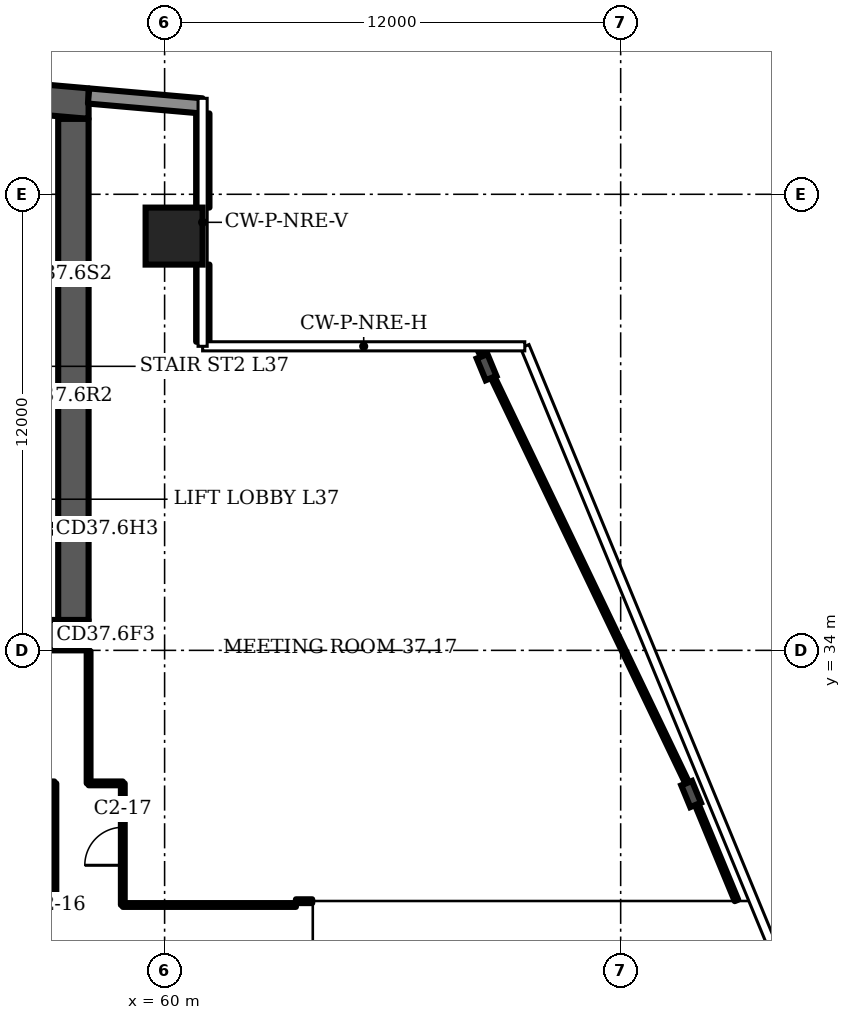
"""IFC4 building model, lengths in metres.
Left out: names, types, materials, properties, quantities, classifications, styles, units other than length and angle.
Written with IfcOpenShell. Run it as: python <this file> out.ifc"""

import sys

from ifc_helpers import new_model, si_unit, direction, frame, frame_2d, origin, origin_2d, place, context, subcontext, project, spatial, polyline, rectangle, i_section, outline, extrude, element, fill, save


model = new_model("IFC4")
c1 = context("Model", 3, precision=1e-05, world=origin(), true_north=direction((0.0, 1.0)))
c2 = subcontext(c1, "Body", "Model", "MODEL_VIEW")
j1 = project(units=[si_unit("LENGTHUNIT", "METRE"), si_unit("PLANEANGLEUNIT", "RADIAN")], contexts=[c1])
p1 = place(None, origin())
s1 = spatial("IfcSite", under=j1, at=p1, CompositionType="ELEMENT")
p2 = place(p1, origin())
s2 = spatial("IfcBuilding", under=s1, at=p2, CompositionType="ELEMENT")
p3 = place(p2, frame((0.0, 0.0, 155.5)))
s3 = spatial("IfcBuildingStorey", under=s2, at=p3, CompositionType="ELEMENT", Elevation=155.5)
p4 = place(p3, origin())
e1 = element("IfcWall", 1, at=p4, inside=s3, PredefinedType="SHEAR", context=c2, shape_type="SweptSolid", body=[
    extrude(outline(polyline([(16.0, 47.984), (37.0, 49.822), (58.0, 47.984), (58.0, 48.787), (37.0, 50.625), (16.0, 48.787), (16.0, 47.984)])), origin(), (0.0, 0.0, 1.0), 3.6),
])
p5 = place(p3, frame((16.0, 34.4, 0.0), z_axis=(0.0, 0.0, 1.0), x_axis=(1.0, 0.0, 0.0)))
e2 = element("IfcWall", 2, at=p5, inside=s3, PredefinedType="SHEAR", context=c2, shape_type="SweptSolid", body=[
    extrude(rectangle(XDim=42.0, YDim=0.8, at=frame_2d((21.0, 0.0))), origin(), (0.0, 0.0, 1.0), 3.6),
])
p6 = place(p5, frame((1.75, 0.0, 0.0)))
e3 = element("IfcOpeningElement", 3, at=p6, cuts=e2, PredefinedType="OPENING", context=c2, shape_type="SweptSolid", body=[
    extrude(rectangle(XDim=1.0, YDim=2.1, at=frame_2d((0.5, 1.05))), frame((0.0, 0.41, 0.0), z_axis=(0.0, -1.0, 0.0), x_axis=(1.0, 0.0, 0.0)), (0.0, 0.0, 1.0), 0.82),
])
p7 = place(p5, frame((4.65, 0.0, 0.0)))
e4 = element("IfcOpeningElement", 4, at=p7, cuts=e2, PredefinedType="OPENING", context=c2, shape_type="SweptSolid", body=[
    extrude(rectangle(XDim=1.0, YDim=2.1, at=frame_2d((0.5, 1.05))), frame((0.0, 0.41, 0.0), z_axis=(0.0, -1.0, 0.0), x_axis=(1.0, 0.0, 0.0)), (0.0, 0.0, 1.0), 0.82),
])
p8 = place(p5, frame((7.65, 0.0, 0.0)))
e5 = element("IfcOpeningElement", 5, at=p8, cuts=e2, PredefinedType="OPENING", context=c2, shape_type="SweptSolid", body=[
    extrude(rectangle(XDim=1.2, YDim=2.1, at=frame_2d((0.6, 1.05))), frame((0.0, 0.41, 0.0), z_axis=(0.0, -1.0, 0.0), x_axis=(1.0, 0.0, 0.0)), (0.0, 0.0, 1.0), 0.82),
])
p9 = place(p5, frame((14.767, 0.0, 0.0)))
e6 = element("IfcOpeningElement", 6, at=p9, cuts=e2, PredefinedType="OPENING", context=c2, shape_type="SweptSolid", body=[
    extrude(rectangle(XDim=1.1, YDim=2.1, at=frame_2d((0.55, 1.05))), frame((0.0, 0.41, 0.0), z_axis=(0.0, -1.0, 0.0), x_axis=(1.0, 0.0, 0.0)), (0.0, 0.0, 1.0), 0.82),
])
p10 = place(p5, frame((19.133, 0.0, 0.0)))
e7 = element("IfcOpeningElement", 7, at=p10, cuts=e2, PredefinedType="OPENING", context=c2, shape_type="SweptSolid", body=[
    extrude(rectangle(XDim=1.1, YDim=2.1, at=frame_2d((0.55, 1.05))), frame((0.0, 0.41, 0.0), z_axis=(0.0, -1.0, 0.0), x_axis=(1.0, 0.0, 0.0)), (0.0, 0.0, 1.0), 0.82),
])
p11 = place(p5, frame((16.8, 0.0, 0.0)))
e8 = element("IfcOpeningElement", 8, at=p11, cuts=e2, PredefinedType="OPENING", context=c2, shape_type="SweptSolid", body=[
    extrude(rectangle(XDim=1.4, YDim=2.1, at=frame_2d((0.7, 1.05))), frame((0.0, 0.41, 0.0), z_axis=(0.0, -1.0, 0.0), x_axis=(1.0, 0.0, 0.0)), (0.0, 0.0, 1.0), 0.82),
])
p12 = place(p5, frame((21.767, 0.0, 0.0)))
e9 = element("IfcOpeningElement", 9, at=p12, cuts=e2, PredefinedType="OPENING", context=c2, shape_type="SweptSolid", body=[
    extrude(rectangle(XDim=1.1, YDim=2.1, at=frame_2d((0.55, 1.05))), frame((0.0, 0.41, 0.0), z_axis=(0.0, -1.0, 0.0), x_axis=(1.0, 0.0, 0.0)), (0.0, 0.0, 1.0), 0.82),
])
p13 = place(p5, frame((23.95, 0.0, 0.0)))
e10 = element("IfcOpeningElement", 10, at=p13, cuts=e2, PredefinedType="OPENING", context=c2, shape_type="SweptSolid", body=[
    extrude(rectangle(XDim=1.1, YDim=2.1, at=frame_2d((0.55, 1.05))), frame((0.0, 0.41, 0.0), z_axis=(0.0, -1.0, 0.0), x_axis=(1.0, 0.0, 0.0)), (0.0, 0.0, 1.0), 0.82),
])
p14 = place(p5, frame((26.133, 0.0, 0.0)))
e11 = element("IfcOpeningElement", 11, at=p14, cuts=e2, PredefinedType="OPENING", context=c2, shape_type="SweptSolid", body=[
    extrude(rectangle(XDim=1.1, YDim=2.1, at=frame_2d((0.55, 1.05))), frame((0.0, 0.41, 0.0), z_axis=(0.0, -1.0, 0.0), x_axis=(1.0, 0.0, 0.0)), (0.0, 0.0, 1.0), 0.82),
])
p15 = place(p5, frame((33.15, 0.0, 0.0)))
e12 = element("IfcOpeningElement", 12, at=p15, cuts=e2, PredefinedType="OPENING", context=c2, shape_type="SweptSolid", body=[
    extrude(rectangle(XDim=1.2, YDim=2.1, at=frame_2d((0.6, 1.05))), frame((0.0, 0.41, 0.0), z_axis=(0.0, -1.0, 0.0), x_axis=(1.0, 0.0, 0.0)), (0.0, 0.0, 1.0), 0.82),
])
p16 = place(p5, frame((35.817, 0.0, 0.0)))
e13 = element("IfcOpeningElement", 13, at=p16, cuts=e2, PredefinedType="OPENING", context=c2, shape_type="SweptSolid", body=[
    extrude(rectangle(XDim=1.0, YDim=2.1, at=frame_2d((0.5, 1.05))), frame((0.0, 0.41, 0.0), z_axis=(0.0, -1.0, 0.0), x_axis=(1.0, 0.0, 0.0)), (0.0, 0.0, 1.0), 0.82),
])
p17 = place(p5, frame((39.95, 0.0, 0.0)))
e14 = element("IfcOpeningElement", 14, at=p17, cuts=e2, PredefinedType="OPENING", context=c2, shape_type="SweptSolid", body=[
    extrude(rectangle(XDim=1.0, YDim=2.1, at=frame_2d((0.5, 1.05))), frame((0.0, 0.41, 0.0), z_axis=(0.0, -1.0, 0.0), x_axis=(1.0, 0.0, 0.0)), (0.0, 0.0, 1.0), 0.82),
])
p18 = place(p5, frame((37.767, 0.0, 0.0)))
e15 = element("IfcOpeningElement", 15, at=p18, cuts=e2, PredefinedType="OPENING", context=c2, shape_type="SweptSolid", body=[
    extrude(rectangle(XDim=1.4, YDim=2.1, at=frame_2d((0.7, 1.05))), frame((0.0, 0.41, 0.0), z_axis=(0.0, -1.0, 0.0), x_axis=(1.0, 0.0, 0.0)), (0.0, 0.0, 1.0), 0.82),
])
p19 = place(p3, frame((57.6, 34.8, 0.0), z_axis=(0.0, 0.0, 1.0), x_axis=(0.0, 1.0, 0.0)))
e16 = element("IfcWall", 16, at=p19, inside=s3, PredefinedType="SHEAR", context=c2, shape_type="SweptSolid", body=[
    extrude(rectangle(XDim=13.184, YDim=0.8, at=frame_2d((6.592, 0.0))), origin(), (0.0, 0.0, 1.0), 3.6),
])
p20 = place(p3, frame((60.25, 44.9, 0.0), z_axis=(0.0, 0.0, 1.0), x_axis=(1.0, 0.0, 0.0)))
e17 = element("IfcColumn", 17, at=p20, inside=s3, PredefinedType="COLUMN", context=c2, shape_type="SweptSolid", body=[
    extrude(rectangle(XDim=1.5, YDim=1.5, at=origin_2d()), origin(), (0.0, 0.0, 1.0), 3.6),
])
for number, where, z_axis, x_axis in (
    (18, (73.854, 30.219, 0.0), (0.0, 0.0, 1.0), (0.924, 0.382, 0.0)),
    (19, (68.472, 41.45, 0.0), (0.0, 0.0, 1.0), (0.924, 0.382, 0.0)),
):
    element("IfcColumn", number, at=place(p3, frame(where, z_axis=z_axis, x_axis=x_axis)), inside=s3, PredefinedType="COLUMN", context=c2, shape_type="SweptSolid", body=[
        extrude(i_section(OverallWidth=0.305, OverallDepth=0.62, WebThickness=0.021, FlangeThickness=0.04, FilletRadius=0.027, at=origin_2d()), origin(), (0.0, 0.0, 1.0), 3.6),
    ])
p21 = place(p3, frame((60.983, 48.326, 0.0), z_axis=(0.0, 0.0, 1.0), x_axis=(-0.996194, 0.087168, 0.0)))
e20 = element("IfcWall", 20, at=p21, inside=s3, PredefinedType="SOLIDWALL", context=c2, shape_type="SweptSolid", body=[
    extrude(rectangle(XDim=2.994, YDim=0.4, at=frame_2d((1.497, 0.0))), origin(), (0.0, 0.0, 1.0), 3.2),
])
p22 = place(p3, frame((61.005, 42.12, 0.0), z_axis=(0.0, 0.0, 1.0), x_axis=(0.0, 1.0, 0.0)))
e21 = element("IfcWall", 21, at=p22, inside=s3, PredefinedType="SOLIDWALL", context=c2, shape_type="SweptSolid", body=[
    extrude(rectangle(XDim=2.03, YDim=0.35, at=frame_2d((1.015, 0.0))), origin(), (0.0, 0.0, 1.0), 1.0),
])
p23 = place(p3, frame((61.005, 45.65, 0.0), z_axis=(0.0, 0.0, 1.0), x_axis=(0.0, 1.0, 0.0)))
e22 = element("IfcWall", 22, at=p23, inside=s3, PredefinedType="SOLIDWALL", context=c2, shape_type="SweptSolid", body=[
    extrude(rectangle(XDim=2.477, YDim=0.35, at=frame_2d((1.238, 0.0))), origin(), (0.0, 0.0, 1.0), 1.0),
])
p24 = place(p3, frame((55.7, 37.2, 0.0), z_axis=(0.0, 0.0, 1.0), x_axis=(1.0, 0.0, 0.0)))
e23 = element("IfcWall", 23, at=p24, inside=s3, PredefinedType="PARTITIONING", context=c2, shape_type="SweptSolid", body=[
    extrude(rectangle(XDim=1.5, YDim=0.2, at=frame_2d((0.75, 0.0))), origin(), (0.0, 0.0, 1.0), 3.2),
])
p25 = place(p24, frame((0.25, 0.0, 0.0)))
e24 = element("IfcOpeningElement", 24, at=p25, cuts=e23, PredefinedType="OPENING", context=c2, shape_type="SweptSolid", body=[
    extrude(rectangle(XDim=1.0, YDim=2.1, at=frame_2d((0.5, 1.05))), frame((0.0, 0.11, 0.0), z_axis=(0.0, -1.0, 0.0), x_axis=(1.0, 0.0, 0.0)), (0.0, 0.0, 1.0), 0.22),
])
p26 = place(p3, frame((51.4, 40.7, 0.0), z_axis=(0.0, 0.0, 1.0), x_axis=(1.0, 0.0, 0.0)))
e25 = element("IfcWall", 25, at=p26, inside=s3, PredefinedType="PARTITIONING", context=c2, shape_type="SweptSolid", body=[
    extrude(rectangle(XDim=5.8, YDim=0.2, at=frame_2d((2.9, 0.0))), origin(), (0.0, 0.0, 1.0), 3.2),
])
p27 = place(p26, frame((0.367, 0.0, 0.0)))
e26 = element("IfcOpeningElement", 26, at=p27, cuts=e25, PredefinedType="OPENING", context=c2, shape_type="SweptSolid", body=[
    extrude(rectangle(XDim=1.1, YDim=2.1, at=frame_2d((0.55, 1.05))), frame((0.0, 0.11, 0.0), z_axis=(0.0, -1.0, 0.0), x_axis=(1.0, 0.0, 0.0)), (0.0, 0.0, 1.0), 0.22),
])
p28 = place(p26, frame((3.417, 0.0, 0.0)))
e27 = element("IfcOpeningElement", 27, at=p28, cuts=e25, PredefinedType="OPENING", context=c2, shape_type="SweptSolid", body=[
    extrude(rectangle(XDim=1.0, YDim=2.1, at=frame_2d((0.5, 1.05))), frame((0.0, 0.11, 0.0), z_axis=(0.0, -1.0, 0.0), x_axis=(1.0, 0.0, 0.0)), (0.0, 0.0, 1.0), 0.22),
])
p29 = place(p3, frame((51.4, 43.9, 0.0), z_axis=(0.0, 0.0, 1.0), x_axis=(1.0, 0.0, 0.0)))
e28 = element("IfcWall", 28, at=p29, inside=s3, PredefinedType="PARTITIONING", context=c2, shape_type="SweptSolid", body=[
    extrude(rectangle(XDim=5.8, YDim=0.2, at=frame_2d((2.9, 0.0))), origin(), (0.0, 0.0, 1.0), 3.2),
])
p30 = place(p29, frame((3.417, 0.0, 0.0)))
e29 = element("IfcOpeningElement", 29, at=p30, cuts=e28, PredefinedType="OPENING", context=c2, shape_type="SweptSolid", body=[
    extrude(rectangle(XDim=1.0, YDim=2.1, at=frame_2d((0.5, 1.05))), frame((0.0, 0.11, 0.0), z_axis=(0.0, -1.0, 0.0), x_axis=(1.0, 0.0, 0.0)), (0.0, 0.0, 1.0), 0.22),
])
p31 = place(p3, frame((23.2, 27.3, 0.0), z_axis=(0.0, 0.0, 1.0), x_axis=(1.0, 0.0, 0.0)))
e30 = element("IfcWall", 30, at=p31, inside=s3, PredefinedType="PARTITIONING", context=c2, shape_type="SweptSolid", body=[
    extrude(rectangle(XDim=33.9, YDim=0.1, at=frame_2d((16.95, 0.0))), origin(), (0.0, 0.0, 1.0), 3.2),
])
p32 = place(p31, frame((16.3, 0.0, 0.0)))
e31 = element("IfcOpeningElement", 31, at=p32, cuts=e30, PredefinedType="OPENING", context=c2, shape_type="SweptSolid", body=[
    extrude(rectangle(XDim=1.0, YDim=2.1, at=frame_2d((0.5, 1.05))), frame((0.0, 0.06, 0.0), z_axis=(0.0, -1.0, 0.0), x_axis=(1.0, 0.0, 0.0)), (0.0, 0.0, 1.0), 0.12),
])
p33 = place(p31, frame((20.72, 0.0, 0.0)))
e32 = element("IfcOpeningElement", 32, at=p33, cuts=e30, PredefinedType="OPENING", context=c2, shape_type="SweptSolid", body=[
    extrude(rectangle(XDim=1.0, YDim=2.1, at=frame_2d((0.5, 1.05))), frame((0.0, 0.06, 0.0), z_axis=(0.0, -1.0, 0.0), x_axis=(1.0, 0.0, 0.0)), (0.0, 0.0, 1.0), 0.12),
])
p34 = place(p31, frame((23.54, 0.0, 0.0)))
e33 = element("IfcOpeningElement", 33, at=p34, cuts=e30, PredefinedType="OPENING", context=c2, shape_type="SweptSolid", body=[
    extrude(rectangle(XDim=1.0, YDim=2.1, at=frame_2d((0.5, 1.05))), frame((0.0, 0.06, 0.0), z_axis=(0.0, -1.0, 0.0), x_axis=(1.0, 0.0, 0.0)), (0.0, 0.0, 1.0), 0.12),
])
p35 = place(p31, frame((26.36, 0.0, 0.0)))
e34 = element("IfcOpeningElement", 34, at=p35, cuts=e30, PredefinedType="OPENING", context=c2, shape_type="SweptSolid", body=[
    extrude(rectangle(XDim=1.0, YDim=2.1, at=frame_2d((0.5, 1.05))), frame((0.0, 0.06, 0.0), z_axis=(0.0, -1.0, 0.0), x_axis=(1.0, 0.0, 0.0)), (0.0, 0.0, 1.0), 0.12),
])
p36 = place(p31, frame((29.18, 0.0, 0.0)))
e35 = element("IfcOpeningElement", 35, at=p36, cuts=e30, PredefinedType="OPENING", context=c2, shape_type="SweptSolid", body=[
    extrude(rectangle(XDim=1.0, YDim=2.1, at=frame_2d((0.5, 1.05))), frame((0.0, 0.06, 0.0), z_axis=(0.0, -1.0, 0.0), x_axis=(1.0, 0.0, 0.0)), (0.0, 0.0, 1.0), 0.12),
])
p37 = place(p31, frame((32.0, 0.0, 0.0)))
e36 = element("IfcOpeningElement", 36, at=p37, cuts=e30, PredefinedType="OPENING", context=c2, shape_type="SweptSolid", body=[
    extrude(rectangle(XDim=1.0, YDim=2.1, at=frame_2d((0.5, 1.05))), frame((0.0, 0.06, 0.0), z_axis=(0.0, -1.0, 0.0), x_axis=(1.0, 0.0, 0.0)), (0.0, 0.0, 1.0), 0.12),
])
p38 = place(p3, frame((57.1, 27.3, 0.0), z_axis=(0.0, 0.0, 1.0), x_axis=(0.0, 1.0, 0.0)))
e37 = element("IfcWall", 37, at=p38, inside=s3, PredefinedType="PARTITIONING", context=c2, shape_type="SweptSolid", body=[
    extrude(rectangle(XDim=3.2, YDim=0.1, at=frame_2d((1.6, 0.0))), origin(), (0.0, 0.0, 1.0), 3.2),
])
p39 = place(p3, frame((58.0, 30.5, 0.0), z_axis=(0.0, 0.0, 1.0), x_axis=(0.0, 1.0, 0.0)))
e38 = element("IfcWall", 38, at=p39, inside=s3, PredefinedType="PARTITIONING", context=c2, shape_type="SweptSolid", body=[
    extrude(rectangle(XDim=3.48, YDim=0.1, at=frame_2d((1.74, 0.0))), origin(), (0.0, 0.0, 1.0), 3.2),
])
p40 = place(p3, frame((58.0, 30.5, 0.0), z_axis=(0.0, 0.0, 1.0), x_axis=(1.0, 0.0, 0.0)))
e39 = element("IfcWall", 39, at=p40, inside=s3, PredefinedType="PARTITIONING", context=c2, shape_type="SweptSolid", body=[
    extrude(rectangle(XDim=0.9, YDim=0.1, at=frame_2d((0.45, 0.0))), origin(), (0.0, 0.0, 1.0), 3.2),
])
p41 = place(p3, frame((58.9, 27.3, 0.0), z_axis=(0.0, 0.0, 1.0), x_axis=(0.0, 1.0, 0.0)))
e40 = element("IfcWall", 40, at=p41, inside=s3, PredefinedType="PARTITIONING", context=c2, shape_type="SweptSolid", body=[
    extrude(rectangle(XDim=3.2, YDim=0.1, at=frame_2d((1.6, 0.0))), origin(), (0.0, 0.0, 1.0), 3.2),
])
p42 = place(p41, frame((1.045, 0.0, 0.0)))
e41 = element("IfcOpeningElement", 41, at=p42, cuts=e40, PredefinedType="OPENING", context=c2, shape_type="SweptSolid", body=[
    extrude(rectangle(XDim=1.0, YDim=2.1, at=frame_2d((0.5, 1.05))), frame((0.0, 0.06, 0.0), z_axis=(0.0, -1.0, 0.0), x_axis=(1.0, 0.0, 0.0)), (0.0, 0.0, 1.0), 0.12),
])
p43 = place(p3, frame((58.9, 27.3, 0.0), z_axis=(0.0, 0.0, 1.0), x_axis=(1.0, 0.0, 0.0)))
e42 = element("IfcWall", 42, at=p43, inside=s3, PredefinedType="PARTITIONING", context=c2, shape_type="SweptSolid", body=[
    extrude(rectangle(XDim=4.555, YDim=0.1, at=frame_2d((2.278, 0.0))), origin(), (0.0, 0.0, 1.0), 3.2),
])
p44 = place(p3, frame((63.455, 27.4, 0.0), z_axis=(0.0, 0.0, 1.0), x_axis=(1.0, 0.0, 0.0)))
e43 = element("IfcWall", 43, at=p44, inside=s3, PredefinedType="PARTITIONING", context=c2, shape_type="SweptSolid", body=[
    extrude(rectangle(XDim=0.429, YDim=0.1, at=frame_2d((0.215, 0.0))), origin(), (0.0, 0.0, 1.0), 3.2),
])
p45 = place(p3, frame((73.885, 30.23, 0.0), z_axis=(0.0, 0.0, 1.0), x_axis=(-0.432167, 0.90179, 0.0)))
e44 = element("IfcWall", 44, at=p45, inside=s3, PredefinedType="PARTITIONING", context=c2, shape_type="SweptSolid", body=[
    extrude(rectangle(XDim=13.036, YDim=0.1, at=frame_2d((6.518, 0.0))), origin(), (0.0, 0.0, 1.0), 3.2),
])
p46 = place(p3, frame((75.047, 27.42, 0.0), z_axis=(0.0, 0.0, 1.0), x_axis=(-0.382024, 0.924148, 0.0)))
e45 = element("IfcWall", 45, at=p46, inside=s3, PredefinedType="PARTITIONING", context=c2, shape_type="SweptSolid", body=[
    extrude(rectangle(XDim=3.041, YDim=0.1, at=frame_2d((1.521, 0.0))), origin(), (0.0, 0.0, 1.0), 2.58),
])
p47 = place(p3, frame((44.15, 30.5, 0.0), z_axis=(0.0, 0.0, 1.0), x_axis=(1.0, 0.0, 0.0)))
e46 = element("IfcWall", 46, at=p47, inside=s3, PredefinedType="PARTITIONING", context=c2, shape_type="SweptSolid", body=[
    extrude(rectangle(XDim=12.95, YDim=0.1, at=frame_2d((6.475, 0.0))), origin(), (0.0, 0.0, 1.0), 3.2),
])
p48 = place(p42, origin())
e47 = element("IfcDoor", 47, at=p48, inside=s3, OperationType="SINGLE_SWING_LEFT", PredefinedType="DOOR", context=c2, shape_type="SweptSolid", body=[
    extrude(rectangle(XDim=1.0, YDim=2.1, at=frame_2d((0.5, 1.05))), frame((0.0, 0.025, 0.0), z_axis=(0.0, -1.0, 0.0), x_axis=(1.0, 0.0, 0.0)), (0.0, 0.0, 1.0), 0.05),
])
fill(e41, e47)
save(model, sys.argv[1])
